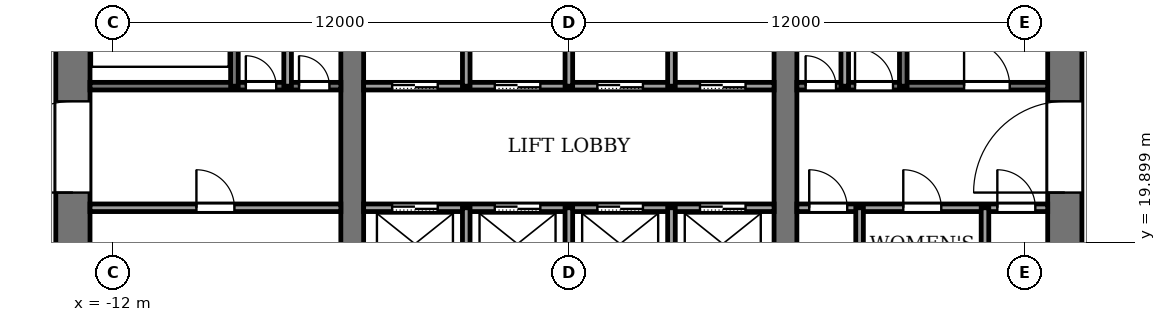
"""IFC4 building model, lengths in metres.
Left out: names, types, materials, properties, quantities, classifications, styles, units other than length and angle.
Written with IfcOpenShell. Run it as: python <this file> out.ifc"""

import sys

from ifc_helpers import new_model, si_unit, direction, frame, frame_2d, origin, place, context, subcontext, project, spatial, rectangle, extrude, element, fill, save


model = new_model("IFC4")
c1 = context("Model", 3, precision=1e-05, world=origin(), true_north=direction((0.0, 1.0)))
c2 = subcontext(c1, "Body", "Model", "MODEL_VIEW")
j1 = project(units=[si_unit("LENGTHUNIT", "METRE"), si_unit("PLANEANGLEUNIT", "RADIAN")], contexts=[c1])
p1 = place(None, origin())
s1 = spatial("IfcSite", under=j1, at=p1, CompositionType="ELEMENT")
p2 = place(p1, origin())
s2 = spatial("IfcBuilding", under=s1, at=p2, CompositionType="ELEMENT")
p3 = place(p2, frame((0.0, 0.0, 177.0)))
s3 = spatial("IfcBuildingStorey", under=s2, at=p3, CompositionType="ELEMENT", Elevation=177.0)
p4 = place(p3, frame((-13.05, 18.4, -0.13), z_axis=(0.0, 0.0, 1.0), x_axis=(0.0, 1.0, 0.0)))
e1 = element("IfcWall", 1, at=p4, inside=s3, PredefinedType="SHEAR", context=c2, shape_type="SweptSolid", body=[
    extrude(rectangle(XDim=19.2, YDim=0.9, at=frame_2d((9.6, 0.0))), origin(), (0.0, 0.0, 1.0), 5.0),
])
p5 = place(p4, frame((2.8, 0.0, 0.13)))
e2 = element("IfcOpeningElement", 2, at=p5, cuts=e1, PredefinedType="OPENING", context=c2, shape_type="SweptSolid", body=[
    extrude(rectangle(XDim=2.4, YDim=2.4, at=frame_2d((1.2, 1.2))), frame((0.0, 0.46, 0.0), z_axis=(0.0, -1.0, 0.0), x_axis=(1.0, 0.0, 0.0)), (0.0, 0.0, 1.0), 0.92),
])
p6 = place(p4, frame((13.4, 0.0, 0.13)))
e3 = element("IfcOpeningElement", 3, at=p6, cuts=e1, PredefinedType="OPENING", context=c2, shape_type="SweptSolid", body=[
    extrude(rectangle(XDim=1.4, YDim=2.2, at=frame_2d((0.7, 1.1))), frame((0.0, 0.46, 0.0), z_axis=(0.0, -1.0, 0.0), x_axis=(1.0, 0.0, 0.0)), (0.0, 0.0, 1.0), 0.92),
])
p7 = place(p3, frame((13.05, 18.4, -0.13), z_axis=(0.0, 0.0, 1.0), x_axis=(0.0, 1.0, 0.0)))
e4 = element("IfcWall", 4, at=p7, inside=s3, PredefinedType="SHEAR", context=c2, shape_type="SweptSolid", body=[
    extrude(rectangle(XDim=19.2, YDim=0.9, at=frame_2d((9.6, 0.0))), origin(), (0.0, 0.0, 1.0), 5.0),
])
p8 = place(p7, frame((2.8, 0.0, 0.13)))
e5 = element("IfcOpeningElement", 5, at=p8, cuts=e4, PredefinedType="OPENING", context=c2, shape_type="SweptSolid", body=[
    extrude(rectangle(XDim=2.4, YDim=2.4, at=frame_2d((1.2, 1.2))), frame((0.0, 0.46, 0.0), z_axis=(0.0, -1.0, 0.0), x_axis=(1.0, 0.0, 0.0)), (0.0, 0.0, 1.0), 0.92),
])
p9 = place(p7, frame((13.3, 0.0, 0.13)))
e6 = element("IfcOpeningElement", 6, at=p9, cuts=e4, PredefinedType="OPENING", context=c2, shape_type="SweptSolid", body=[
    extrude(rectangle(XDim=2.4, YDim=2.4, at=frame_2d((1.2, 1.2))), frame((0.0, 0.46, 0.0), z_axis=(0.0, -1.0, 0.0), x_axis=(1.0, 0.0, 0.0)), (0.0, 0.0, 1.0), 0.92),
])
p10 = place(p3, frame((-5.7, 18.4, -0.13), z_axis=(0.0, 0.0, 1.0), x_axis=(0.0, 1.0, 0.0)))
e7 = element("IfcWall", 7, at=p10, inside=s3, PredefinedType="SHEAR", context=c2, shape_type="SweptSolid", body=[
    extrude(rectangle(XDim=19.2, YDim=0.6, at=frame_2d((9.6, 0.0))), origin(), (0.0, 0.0, 1.0), 5.0),
])
p11 = place(p10, frame((8.35, 0.0, 0.13)))
e8 = element("IfcOpeningElement", 8, at=p11, cuts=e7, PredefinedType="OPENING", context=c2, shape_type="SweptSolid", body=[
    extrude(rectangle(XDim=0.9, YDim=2.1, at=frame_2d((0.45, 1.05))), frame((0.0, 0.31, 0.0), z_axis=(0.0, -1.0, 0.0), x_axis=(1.0, 0.0, 0.0)), (0.0, 0.0, 1.0), 0.62),
])
p12 = place(p3, frame((5.7, 18.4, -0.13), z_axis=(0.0, 0.0, 1.0), x_axis=(0.0, 1.0, 0.0)))
e9 = element("IfcWall", 9, at=p12, inside=s3, PredefinedType="SHEAR", context=c2, shape_type="SweptSolid", body=[
    extrude(rectangle(XDim=19.2, YDim=0.6, at=frame_2d((9.6, 0.0))), origin(), (0.0, 0.0, 1.0), 5.0),
])
p13 = place(p12, frame((13.3, 0.0, 0.13)))
e10 = element("IfcOpeningElement", 10, at=p13, cuts=e9, PredefinedType="OPENING", context=c2, shape_type="SweptSolid", body=[
    extrude(rectangle(XDim=2.4, YDim=2.4, at=frame_2d((1.2, 1.2))), frame((0.0, 0.31, 0.0), z_axis=(0.0, -1.0, 0.0), x_axis=(1.0, 0.0, 0.0)), (0.0, 0.0, 1.0), 0.62),
])
p14 = place(p3, frame((-12.6, 20.8, 0.0), z_axis=(0.0, 0.0, 1.0), x_axis=(1.0, 0.0, 0.0)))
e11 = element("IfcWall", 11, at=p14, inside=s3, PredefinedType="PARTITIONING", context=c2, shape_type="SweptSolid", body=[
    extrude(rectangle(XDim=6.6, YDim=0.2, at=frame_2d((3.3, 0.0))), origin(), (0.0, 0.0, 1.0), 4.87),
])
p15 = place(p14, frame((2.8, 0.0, 0.0)))
e12 = element("IfcOpeningElement", 12, at=p15, cuts=e11, PredefinedType="OPENING", context=c2, shape_type="SweptSolid", body=[
    extrude(rectangle(XDim=1.0, YDim=2.1, at=frame_2d((0.5, 1.05))), frame((0.0, 0.11, 0.0), z_axis=(0.0, -1.0, 0.0), x_axis=(1.0, 0.0, 0.0)), (0.0, 0.0, 1.0), 0.22),
])
p16 = place(p3, frame((-5.4, 20.8, 0.0), z_axis=(0.0, 0.0, 1.0), x_axis=(1.0, 0.0, 0.0)))
e13 = element("IfcWall", 13, at=p16, inside=s3, PredefinedType="PARTITIONING", context=c2, shape_type="SweptSolid", body=[
    extrude(rectangle(XDim=10.8, YDim=0.2, at=frame_2d((5.4, 0.0))), origin(), (0.0, 0.0, 1.0), 4.87),
])
p17 = place(p16, frame((0.75, 0.0, 0.0)))
e14 = element("IfcOpeningElement", 14, at=p17, cuts=e13, PredefinedType="OPENING", context=c2, shape_type="SweptSolid", body=[
    extrude(rectangle(XDim=1.2, YDim=2.2, at=frame_2d((0.6, 1.1))), frame((0.0, 0.11, 0.0), z_axis=(0.0, -1.0, 0.0), x_axis=(1.0, 0.0, 0.0)), (0.0, 0.0, 1.0), 0.22),
])
p18 = place(p16, frame((3.45, 0.0, 0.0)))
e15 = element("IfcOpeningElement", 15, at=p18, cuts=e13, PredefinedType="OPENING", context=c2, shape_type="SweptSolid", body=[
    extrude(rectangle(XDim=1.2, YDim=2.2, at=frame_2d((0.6, 1.1))), frame((0.0, 0.11, 0.0), z_axis=(0.0, -1.0, 0.0), x_axis=(1.0, 0.0, 0.0)), (0.0, 0.0, 1.0), 0.22),
])
p19 = place(p16, frame((6.15, 0.0, 0.0)))
e16 = element("IfcOpeningElement", 16, at=p19, cuts=e13, PredefinedType="OPENING", context=c2, shape_type="SweptSolid", body=[
    extrude(rectangle(XDim=1.2, YDim=2.2, at=frame_2d((0.6, 1.1))), frame((0.0, 0.11, 0.0), z_axis=(0.0, -1.0, 0.0), x_axis=(1.0, 0.0, 0.0)), (0.0, 0.0, 1.0), 0.22),
])
p20 = place(p16, frame((8.85, 0.0, 0.0)))
e17 = element("IfcOpeningElement", 17, at=p20, cuts=e13, PredefinedType="OPENING", context=c2, shape_type="SweptSolid", body=[
    extrude(rectangle(XDim=1.2, YDim=2.2, at=frame_2d((0.6, 1.1))), frame((0.0, 0.11, 0.0), z_axis=(0.0, -1.0, 0.0), x_axis=(1.0, 0.0, 0.0)), (0.0, 0.0, 1.0), 0.22),
])
p21 = place(p3, frame((6.0, 20.8, 0.0), z_axis=(0.0, 0.0, 1.0), x_axis=(1.0, 0.0, 0.0)))
e18 = element("IfcWall", 18, at=p21, inside=s3, PredefinedType="PARTITIONING", context=c2, shape_type="SweptSolid", body=[
    extrude(rectangle(XDim=6.6, YDim=0.2, at=frame_2d((3.3, 0.0))), origin(), (0.0, 0.0, 1.0), 4.87),
])
p22 = place(p21, frame((0.325, 0.0, 0.0)))
e19 = element("IfcOpeningElement", 19, at=p22, cuts=e18, PredefinedType="OPENING", context=c2, shape_type="SweptSolid", body=[
    extrude(rectangle(XDim=1.0, YDim=2.1, at=frame_2d((0.5, 1.05))), frame((0.0, 0.11, 0.0), z_axis=(0.0, -1.0, 0.0), x_axis=(1.0, 0.0, 0.0)), (0.0, 0.0, 1.0), 0.22),
])
p23 = place(p21, frame((2.8, 0.0, 0.0)))
e20 = element("IfcOpeningElement", 20, at=p23, cuts=e18, PredefinedType="OPENING", context=c2, shape_type="SweptSolid", body=[
    extrude(rectangle(XDim=1.0, YDim=2.1, at=frame_2d((0.5, 1.05))), frame((0.0, 0.11, 0.0), z_axis=(0.0, -1.0, 0.0), x_axis=(1.0, 0.0, 0.0)), (0.0, 0.0, 1.0), 0.22),
])
p24 = place(p21, frame((5.275, 0.0, 0.0)))
e21 = element("IfcOpeningElement", 21, at=p24, cuts=e18, PredefinedType="OPENING", context=c2, shape_type="SweptSolid", body=[
    extrude(rectangle(XDim=1.0, YDim=2.1, at=frame_2d((0.5, 1.05))), frame((0.0, 0.11, 0.0), z_axis=(0.0, -1.0, 0.0), x_axis=(1.0, 0.0, 0.0)), (0.0, 0.0, 1.0), 0.22),
])
p25 = place(p3, frame((-12.6, 24.0, 0.0), z_axis=(0.0, 0.0, 1.0), x_axis=(1.0, 0.0, 0.0)))
e22 = element("IfcWall", 22, at=p25, inside=s3, PredefinedType="PARTITIONING", context=c2, shape_type="SweptSolid", body=[
    extrude(rectangle(XDim=6.6, YDim=0.2, at=frame_2d((3.3, 0.0))), origin(), (0.0, 0.0, 1.0), 4.87),
])
p26 = place(p25, frame((4.1, 0.0, 0.0)))
e23 = element("IfcOpeningElement", 23, at=p26, cuts=e22, PredefinedType="OPENING", context=c2, shape_type="SweptSolid", body=[
    extrude(rectangle(XDim=0.8, YDim=2.1, at=frame_2d((0.4, 1.05))), frame((0.0, 0.11, 0.0), z_axis=(0.0, -1.0, 0.0), x_axis=(1.0, 0.0, 0.0)), (0.0, 0.0, 1.0), 0.22),
])
p27 = place(p25, frame((5.5, 0.0, 0.0)))
e24 = element("IfcOpeningElement", 24, at=p27, cuts=e22, PredefinedType="OPENING", context=c2, shape_type="SweptSolid", body=[
    extrude(rectangle(XDim=0.8, YDim=2.1, at=frame_2d((0.4, 1.05))), frame((0.0, 0.11, 0.0), z_axis=(0.0, -1.0, 0.0), x_axis=(1.0, 0.0, 0.0)), (0.0, 0.0, 1.0), 0.22),
])
p28 = place(p3, frame((-5.4, 24.0, 0.0), z_axis=(0.0, 0.0, 1.0), x_axis=(1.0, 0.0, 0.0)))
e25 = element("IfcWall", 25, at=p28, inside=s3, PredefinedType="PARTITIONING", context=c2, shape_type="SweptSolid", body=[
    extrude(rectangle(XDim=10.8, YDim=0.2, at=frame_2d((5.4, 0.0))), origin(), (0.0, 0.0, 1.0), 4.87),
])
p29 = place(p28, frame((0.75, 0.0, 0.0)))
e26 = element("IfcOpeningElement", 26, at=p29, cuts=e25, PredefinedType="OPENING", context=c2, shape_type="SweptSolid", body=[
    extrude(rectangle(XDim=1.2, YDim=2.2, at=frame_2d((0.6, 1.1))), frame((0.0, 0.11, 0.0), z_axis=(0.0, -1.0, 0.0), x_axis=(1.0, 0.0, 0.0)), (0.0, 0.0, 1.0), 0.22),
])
p30 = place(p28, frame((3.45, 0.0, 0.0)))
e27 = element("IfcOpeningElement", 27, at=p30, cuts=e25, PredefinedType="OPENING", context=c2, shape_type="SweptSolid", body=[
    extrude(rectangle(XDim=1.2, YDim=2.2, at=frame_2d((0.6, 1.1))), frame((0.0, 0.11, 0.0), z_axis=(0.0, -1.0, 0.0), x_axis=(1.0, 0.0, 0.0)), (0.0, 0.0, 1.0), 0.22),
])
p31 = place(p28, frame((6.15, 0.0, 0.0)))
e28 = element("IfcOpeningElement", 28, at=p31, cuts=e25, PredefinedType="OPENING", context=c2, shape_type="SweptSolid", body=[
    extrude(rectangle(XDim=1.2, YDim=2.2, at=frame_2d((0.6, 1.1))), frame((0.0, 0.11, 0.0), z_axis=(0.0, -1.0, 0.0), x_axis=(1.0, 0.0, 0.0)), (0.0, 0.0, 1.0), 0.22),
])
p32 = place(p28, frame((8.85, 0.0, 0.0)))
e29 = element("IfcOpeningElement", 29, at=p32, cuts=e25, PredefinedType="OPENING", context=c2, shape_type="SweptSolid", body=[
    extrude(rectangle(XDim=1.2, YDim=2.2, at=frame_2d((0.6, 1.1))), frame((0.0, 0.11, 0.0), z_axis=(0.0, -1.0, 0.0), x_axis=(1.0, 0.0, 0.0)), (0.0, 0.0, 1.0), 0.22),
])
p33 = place(p3, frame((6.0, 24.0, 0.0), z_axis=(0.0, 0.0, 1.0), x_axis=(1.0, 0.0, 0.0)))
e30 = element("IfcWall", 30, at=p33, inside=s3, PredefinedType="PARTITIONING", context=c2, shape_type="SweptSolid", body=[
    extrude(rectangle(XDim=6.6, YDim=0.2, at=frame_2d((3.3, 0.0))), origin(), (0.0, 0.0, 1.0), 4.87),
])
p34 = place(p33, frame((0.23, 0.0, 0.0)))
e31 = element("IfcOpeningElement", 31, at=p34, cuts=e30, PredefinedType="OPENING", context=c2, shape_type="SweptSolid", body=[
    extrude(rectangle(XDim=0.8, YDim=2.1, at=frame_2d((0.4, 1.05))), frame((0.0, 0.11, 0.0), z_axis=(0.0, -1.0, 0.0), x_axis=(1.0, 0.0, 0.0)), (0.0, 0.0, 1.0), 0.22),
])
p35 = place(p33, frame((1.53, 0.0, 0.0)))
e32 = element("IfcOpeningElement", 32, at=p35, cuts=e30, PredefinedType="OPENING", context=c2, shape_type="SweptSolid", body=[
    extrude(rectangle(XDim=1.0, YDim=2.1, at=frame_2d((0.5, 1.05))), frame((0.0, 0.11, 0.0), z_axis=(0.0, -1.0, 0.0), x_axis=(1.0, 0.0, 0.0)), (0.0, 0.0, 1.0), 0.22),
])
p36 = place(p33, frame((4.4, 0.0, 0.0)))
e33 = element("IfcOpeningElement", 33, at=p36, cuts=e30, PredefinedType="OPENING", context=c2, shape_type="SweptSolid", body=[
    extrude(rectangle(XDim=1.2, YDim=2.2, at=frame_2d((0.6, 1.1))), frame((0.0, 0.11, 0.0), z_axis=(0.0, -1.0, 0.0), x_axis=(1.0, 0.0, 0.0)), (0.0, 0.0, 1.0), 0.22),
])
for number, where, z_axis, x_axis in (
    (34, (-8.8, 24.0, 0.0), (0.0, 0.0, 1.0), (0.0, 1.0, 0.0)),
    (35, (-7.4, 24.0, 0.0), (0.0, 0.0, 1.0), (0.0, 1.0, 0.0)),
):
    element("IfcWall", number, at=place(p3, frame(where, z_axis=z_axis, x_axis=x_axis)), inside=s3, PredefinedType="PARTITIONING", context=c2, shape_type="SweptSolid", body=[
        extrude(rectangle(XDim=7.4, YDim=0.2, at=frame_2d((3.7, 0.0))), origin(), (0.0, 0.0, 1.0), 4.87),
    ])
p37 = place(p3, frame((-2.7, 18.4, 0.0), z_axis=(0.0, 0.0, 1.0), x_axis=(0.0, 1.0, 0.0)))
e36 = element("IfcWall", 36, at=p37, inside=s3, PredefinedType="PARTITIONING", context=c2, shape_type="SweptSolid", body=[
    extrude(rectangle(XDim=2.4, YDim=0.2, at=frame_2d((1.2, 0.0))), origin(), (0.0, 0.0, 1.0), 4.87),
])
p38 = place(p3, frame((-2.7, 24.0, 0.0), z_axis=(0.0, 0.0, 1.0), x_axis=(0.0, 1.0, 0.0)))
e37 = element("IfcWall", 37, at=p38, inside=s3, PredefinedType="PARTITIONING", context=c2, shape_type="SweptSolid", body=[
    extrude(rectangle(XDim=2.4, YDim=0.2, at=frame_2d((1.2, 0.0))), origin(), (0.0, 0.0, 1.0), 4.87),
])
p39 = place(p3, frame((0.0, 18.4, 0.0), z_axis=(0.0, 0.0, 1.0), x_axis=(0.0, 1.0, 0.0)))
e38 = element("IfcWall", 38, at=p39, inside=s3, PredefinedType="PARTITIONING", context=c2, shape_type="SweptSolid", body=[
    extrude(rectangle(XDim=2.4, YDim=0.2, at=frame_2d((1.2, 0.0))), origin(), (0.0, 0.0, 1.0), 4.87),
])
p40 = place(p3, frame((0.0, 24.0, 0.0), z_axis=(0.0, 0.0, 1.0), x_axis=(0.0, 1.0, 0.0)))
e39 = element("IfcWall", 39, at=p40, inside=s3, PredefinedType="PARTITIONING", context=c2, shape_type="SweptSolid", body=[
    extrude(rectangle(XDim=2.4, YDim=0.2, at=frame_2d((1.2, 0.0))), origin(), (0.0, 0.0, 1.0), 4.87),
])
p41 = place(p3, frame((2.7, 18.4, 0.0), z_axis=(0.0, 0.0, 1.0), x_axis=(0.0, 1.0, 0.0)))
e40 = element("IfcWall", 40, at=p41, inside=s3, PredefinedType="PARTITIONING", context=c2, shape_type="SweptSolid", body=[
    extrude(rectangle(XDim=2.4, YDim=0.2, at=frame_2d((1.2, 0.0))), origin(), (0.0, 0.0, 1.0), 4.87),
])
p42 = place(p3, frame((2.7, 24.0, 0.0), z_axis=(0.0, 0.0, 1.0), x_axis=(0.0, 1.0, 0.0)))
e41 = element("IfcWall", 41, at=p42, inside=s3, PredefinedType="PARTITIONING", context=c2, shape_type="SweptSolid", body=[
    extrude(rectangle(XDim=2.4, YDim=0.2, at=frame_2d((1.2, 0.0))), origin(), (0.0, 0.0, 1.0), 4.87),
])
p43 = place(p3, frame((7.26, 24.0, 0.0), z_axis=(0.0, 0.0, 1.0), x_axis=(0.0, 1.0, 0.0)))
e42 = element("IfcWall", 42, at=p43, inside=s3, PredefinedType="PARTITIONING", context=c2, shape_type="SweptSolid", body=[
    extrude(rectangle(XDim=7.4, YDim=0.2, at=frame_2d((3.7, 0.0))), origin(), (0.0, 0.0, 1.0), 4.87),
])
p44 = place(p3, frame((7.65, 18.4, 0.0), z_axis=(0.0, 0.0, 1.0), x_axis=(0.0, 1.0, 0.0)))
e43 = element("IfcWall", 43, at=p44, inside=s3, PredefinedType="PARTITIONING", context=c2, shape_type="SweptSolid", body=[
    extrude(rectangle(XDim=2.4, YDim=0.2, at=frame_2d((1.2, 0.0))), origin(), (0.0, 0.0, 1.0), 4.87),
])
p45 = place(p3, frame((8.8, 24.0, 0.0), z_axis=(0.0, 0.0, 1.0), x_axis=(0.0, 1.0, 0.0)))
e44 = element("IfcWall", 44, at=p45, inside=s3, PredefinedType="PARTITIONING", context=c2, shape_type="SweptSolid", body=[
    extrude(rectangle(XDim=7.4, YDim=0.2, at=frame_2d((3.7, 0.0))), origin(), (0.0, 0.0, 1.0), 4.87),
])
p46 = place(p3, frame((10.95, 18.4, 0.0), z_axis=(0.0, 0.0, 1.0), x_axis=(0.0, 1.0, 0.0)))
e45 = element("IfcWall", 45, at=p46, inside=s3, PredefinedType="PARTITIONING", context=c2, shape_type="SweptSolid", body=[
    extrude(rectangle(XDim=2.4, YDim=0.2, at=frame_2d((1.2, 0.0))), origin(), (0.0, 0.0, 1.0), 4.87),
])
p47 = place(p17, origin())
e46 = element("IfcDoor", 46, at=p47, inside=s3, OperationType="SLIDING_TO_LEFT", PredefinedType="DOOR", context=c2, shape_type="SweptSolid", body=[
    extrude(rectangle(XDim=1.2, YDim=2.2, at=frame_2d((0.6, 1.1))), frame((0.0, 0.025, 0.0), z_axis=(0.0, -1.0, 0.0), x_axis=(1.0, 0.0, 0.0)), (0.0, 0.0, 1.0), 0.05),
])
fill(e14, e46)
p48 = place(p18, origin())
e47 = element("IfcDoor", 47, at=p48, inside=s3, OperationType="SLIDING_TO_LEFT", PredefinedType="DOOR", context=c2, shape_type="SweptSolid", body=[
    extrude(rectangle(XDim=1.2, YDim=2.2, at=frame_2d((0.6, 1.1))), frame((0.0, 0.025, 0.0), z_axis=(0.0, -1.0, 0.0), x_axis=(1.0, 0.0, 0.0)), (0.0, 0.0, 1.0), 0.05),
])
fill(e15, e47)
p49 = place(p19, origin())
e48 = element("IfcDoor", 48, at=p49, inside=s3, OperationType="SLIDING_TO_LEFT", PredefinedType="DOOR", context=c2, shape_type="SweptSolid", body=[
    extrude(rectangle(XDim=1.2, YDim=2.2, at=frame_2d((0.6, 1.1))), frame((0.0, 0.025, 0.0), z_axis=(0.0, -1.0, 0.0), x_axis=(1.0, 0.0, 0.0)), (0.0, 0.0, 1.0), 0.05),
])
fill(e16, e48)
p50 = place(p20, origin())
e49 = element("IfcDoor", 49, at=p50, inside=s3, OperationType="SLIDING_TO_LEFT", PredefinedType="DOOR", context=c2, shape_type="SweptSolid", body=[
    extrude(rectangle(XDim=1.2, YDim=2.2, at=frame_2d((0.6, 1.1))), frame((0.0, 0.025, 0.0), z_axis=(0.0, -1.0, 0.0), x_axis=(1.0, 0.0, 0.0)), (0.0, 0.0, 1.0), 0.05),
])
fill(e17, e49)
p51 = place(p29, origin())
e50 = element("IfcDoor", 50, at=p51, inside=s3, OperationType="SLIDING_TO_LEFT", PredefinedType="DOOR", context=c2, shape_type="SweptSolid", body=[
    extrude(rectangle(XDim=1.2, YDim=2.2, at=frame_2d((0.6, 1.1))), frame((0.0, 0.025, 0.0), z_axis=(0.0, -1.0, 0.0), x_axis=(1.0, 0.0, 0.0)), (0.0, 0.0, 1.0), 0.05),
])
fill(e26, e50)
p52 = place(p30, origin())
e51 = element("IfcDoor", 51, at=p52, inside=s3, OperationType="SLIDING_TO_LEFT", PredefinedType="DOOR", context=c2, shape_type="SweptSolid", body=[
    extrude(rectangle(XDim=1.2, YDim=2.2, at=frame_2d((0.6, 1.1))), frame((0.0, 0.025, 0.0), z_axis=(0.0, -1.0, 0.0), x_axis=(1.0, 0.0, 0.0)), (0.0, 0.0, 1.0), 0.05),
])
fill(e27, e51)
p53 = place(p31, origin())
e52 = element("IfcDoor", 52, at=p53, inside=s3, OperationType="SLIDING_TO_LEFT", PredefinedType="DOOR", context=c2, shape_type="SweptSolid", body=[
    extrude(rectangle(XDim=1.2, YDim=2.2, at=frame_2d((0.6, 1.1))), frame((0.0, 0.025, 0.0), z_axis=(0.0, -1.0, 0.0), x_axis=(1.0, 0.0, 0.0)), (0.0, 0.0, 1.0), 0.05),
])
fill(e28, e52)
p54 = place(p32, origin())
e53 = element("IfcDoor", 53, at=p54, inside=s3, OperationType="SLIDING_TO_LEFT", PredefinedType="DOOR", context=c2, shape_type="SweptSolid", body=[
    extrude(rectangle(XDim=1.2, YDim=2.2, at=frame_2d((0.6, 1.1))), frame((0.0, 0.025, 0.0), z_axis=(0.0, -1.0, 0.0), x_axis=(1.0, 0.0, 0.0)), (0.0, 0.0, 1.0), 0.05),
])
fill(e29, e53)
p55 = place(p15, origin())
e54 = element("IfcDoor", 54, at=p55, inside=s3, OperationType="SINGLE_SWING_LEFT", PredefinedType="DOOR", context=c2, shape_type="SweptSolid", body=[
    extrude(rectangle(XDim=1.0, YDim=2.1, at=frame_2d((0.5, 1.05))), frame((0.0, 0.025, 0.0), z_axis=(0.0, -1.0, 0.0), x_axis=(1.0, 0.0, 0.0)), (0.0, 0.0, 1.0), 0.05),
])
fill(e12, e54)
p56 = place(p22, origin())
e55 = element("IfcDoor", 55, at=p56, inside=s3, OperationType="SINGLE_SWING_LEFT", PredefinedType="DOOR", context=c2, shape_type="SweptSolid", body=[
    extrude(rectangle(XDim=1.0, YDim=2.1, at=frame_2d((0.5, 1.05))), frame((0.0, 0.025, 0.0), z_axis=(0.0, -1.0, 0.0), x_axis=(1.0, 0.0, 0.0)), (0.0, 0.0, 1.0), 0.05),
])
fill(e19, e55)
p57 = place(p23, origin())
e56 = element("IfcDoor", 56, at=p57, inside=s3, OperationType="SINGLE_SWING_LEFT", PredefinedType="DOOR", context=c2, shape_type="SweptSolid", body=[
    extrude(rectangle(XDim=1.0, YDim=2.1, at=frame_2d((0.5, 1.05))), frame((0.0, 0.025, 0.0), z_axis=(0.0, -1.0, 0.0), x_axis=(1.0, 0.0, 0.0)), (0.0, 0.0, 1.0), 0.05),
])
fill(e20, e56)
p58 = place(p24, origin())
e57 = element("IfcDoor", 57, at=p58, inside=s3, OperationType="SINGLE_SWING_LEFT", PredefinedType="DOOR", context=c2, shape_type="SweptSolid", body=[
    extrude(rectangle(XDim=1.0, YDim=2.1, at=frame_2d((0.5, 1.05))), frame((0.0, 0.025, 0.0), z_axis=(0.0, -1.0, 0.0), x_axis=(1.0, 0.0, 0.0)), (0.0, 0.0, 1.0), 0.05),
])
fill(e21, e57)
p59 = place(p26, origin())
e58 = element("IfcDoor", 58, at=p59, inside=s3, OperationType="SINGLE_SWING_LEFT", PredefinedType="DOOR", context=c2, shape_type="SweptSolid", body=[
    extrude(rectangle(XDim=0.8, YDim=2.1, at=frame_2d((0.4, 1.05))), frame((0.0, 0.025, 0.0), z_axis=(0.0, -1.0, 0.0), x_axis=(1.0, 0.0, 0.0)), (0.0, 0.0, 1.0), 0.05),
])
fill(e23, e58)
p60 = place(p27, origin())
e59 = element("IfcDoor", 59, at=p60, inside=s3, OperationType="SINGLE_SWING_RIGHT", PredefinedType="DOOR", context=c2, shape_type="SweptSolid", body=[
    extrude(rectangle(XDim=0.8, YDim=2.1, at=frame_2d((0.4, 1.05))), frame((0.0, 0.025, 0.0), z_axis=(0.0, -1.0, 0.0), x_axis=(1.0, 0.0, 0.0)), (0.0, 0.0, 1.0), 0.05),
])
fill(e24, e59)
p61 = place(p34, origin())
e60 = element("IfcDoor", 60, at=p61, inside=s3, OperationType="SINGLE_SWING_RIGHT", PredefinedType="DOOR", context=c2, shape_type="SweptSolid", body=[
    extrude(rectangle(XDim=0.8, YDim=2.1, at=frame_2d((0.4, 1.05))), frame((0.0, 0.025, 0.0), z_axis=(0.0, -1.0, 0.0), x_axis=(1.0, 0.0, 0.0)), (0.0, 0.0, 1.0), 0.05),
])
fill(e31, e60)
p62 = place(p35, origin())
e61 = element("IfcDoor", 61, at=p62, inside=s3, OperationType="SINGLE_SWING_LEFT", PredefinedType="DOOR", context=c2, shape_type="SweptSolid", body=[
    extrude(rectangle(XDim=1.0, YDim=2.1, at=frame_2d((0.5, 1.05))), frame((0.0, 0.025, 0.0), z_axis=(0.0, -1.0, 0.0), x_axis=(1.0, 0.0, 0.0)), (0.0, 0.0, 1.0), 0.05),
])
fill(e32, e61)
p63 = place(p36, origin())
e62 = element("IfcDoor", 62, at=p63, inside=s3, OperationType="SINGLE_SWING_LEFT", PredefinedType="DOOR", context=c2, shape_type="SweptSolid", body=[
    extrude(rectangle(XDim=1.2, YDim=2.2, at=frame_2d((0.6, 1.1))), frame((0.0, 0.025, 0.0), z_axis=(0.0, -1.0, 0.0), x_axis=(1.0, 0.0, 0.0)), (0.0, 0.0, 1.0), 0.05),
])
fill(e33, e62)
p64 = place(p5, origin())
e63 = element("IfcDoor", 63, at=p64, inside=s3, OperationType="DOUBLE_DOOR_SINGLE_SWING", PredefinedType="DOOR", context=c2, shape_type="SweptSolid", body=[
    extrude(rectangle(XDim=2.4, YDim=2.4, at=frame_2d((1.2, 1.2))), frame((0.0, 0.025, 0.0), z_axis=(0.0, -1.0, 0.0), x_axis=(1.0, 0.0, 0.0)), (0.0, 0.0, 1.0), 0.05),
])
fill(e2, e63)
p65 = place(p8, origin())
e64 = element("IfcDoor", 64, at=p65, inside=s3, OperationType="DOUBLE_DOOR_SINGLE_SWING", PredefinedType="DOOR", context=c2, shape_type="SweptSolid", body=[
    extrude(rectangle(XDim=2.4, YDim=2.4, at=frame_2d((1.2, 1.2))), frame((0.0, 0.025, 0.0), z_axis=(0.0, -1.0, 0.0), x_axis=(1.0, 0.0, 0.0)), (0.0, 0.0, 1.0), 0.05),
])
fill(e5, e64)
save(model, sys.argv[1])
